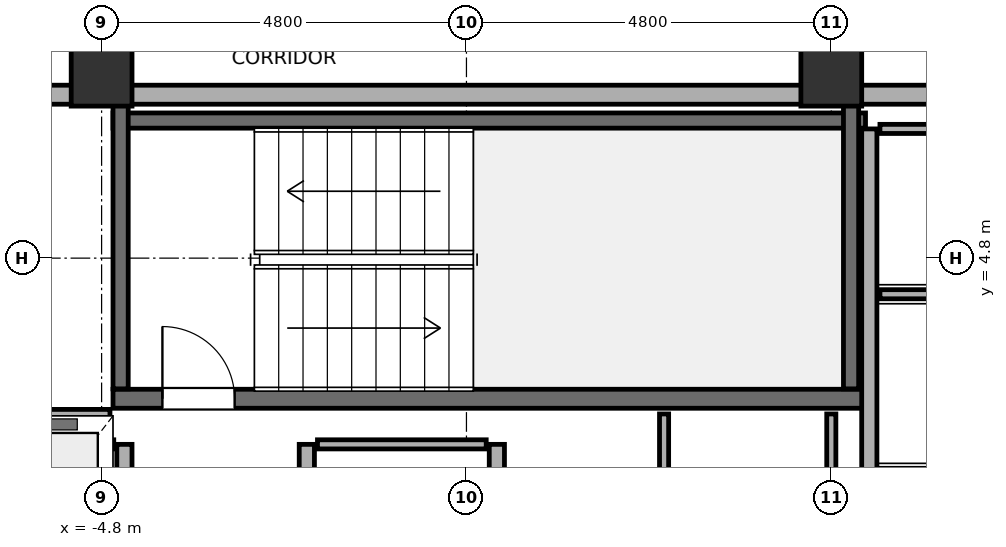
"""IFC4 building model, lengths in metres.
Left out: names, types, materials, properties, quantities, classifications, styles, units other than length and angle.
Written with IfcOpenShell. Run it as: python <this file> out.ifc"""

import sys

from ifc_helpers import new_model, si_unit, direction, frame, frame_2d, origin, origin_2d, place, context, subcontext, project, spatial, rectangle, hollow_rectangle, extrude, element, fill, save


model = new_model("IFC4")
c1 = context("Model", 3, precision=1e-05, world=origin(), true_north=direction((0.0, 1.0)))
c2 = subcontext(c1, "Body", "Model", "MODEL_VIEW")
j1 = project(units=[si_unit("LENGTHUNIT", "METRE"), si_unit("PLANEANGLEUNIT", "RADIAN")], contexts=[c1])
p1 = place(None, origin())
s1 = spatial("IfcSite", under=j1, at=p1, CompositionType="ELEMENT")
p2 = place(p1, origin())
s2 = spatial("IfcBuilding", under=s1, at=p2, CompositionType="ELEMENT")
p3 = place(p2, frame((0.0, 0.0, 30.0)))
s3 = spatial("IfcBuildingStorey", under=s2, at=p3, CompositionType="ELEMENT", Elevation=30.0)
for number, where, z_axis, x_axis in (
    (1, (-4.8, 7.2, 0.0), (0.0, 0.0, 1.0), (1.0, 0.0, 0.0)),
    (2, (4.8, 7.2, 0.0), (0.0, 0.0, 1.0), (1.0, 0.0, 0.0)),
):
    element("IfcColumn", number, at=place(p3, frame(where, z_axis=z_axis, x_axis=x_axis)), inside=s3, PredefinedType="COLUMN", context=c2, shape_type="SweptSolid", body=[
        extrude(hollow_rectangle(XDim=0.8, YDim=0.8, WallThickness=0.036, at=origin_2d()), origin(), (0.0, 0.0, 1.0), 3.7),
    ])
p4 = place(p3, frame((-14.2, 6.95, 0.0), z_axis=(0.0, 0.0, 1.0), x_axis=(1.0, 0.0, 0.0)))
e3 = element("IfcWall", 3, at=p4, inside=s3, PredefinedType="SOLIDWALL", context=c2, shape_type="SweptSolid", body=[
    extrude(rectangle(XDim=9.4, YDim=0.25, at=frame_2d((4.7, 0.0))), origin(), (0.0, 0.0, 1.0), 2.12),
])
p5 = place(p4, frame((4.9, 0.0, 0.0)))
e4 = element("IfcOpeningElement", 4, at=p5, cuts=e3, PredefinedType="OPENING", context=c2, shape_type="SweptSolid", body=[
    extrude(rectangle(XDim=1.0, YDim=2.02, at=frame_2d((0.5, 1.01))), frame((0.0, 0.14, 0.0), z_axis=(0.0, -1.0, 0.0), x_axis=(1.0, 0.0, 0.0)), (0.0, 0.0, 1.0), 0.28),
])
p6 = place(p3, frame((-4.6, 6.95, 0.0), z_axis=(0.0, 0.0, 1.0), x_axis=(1.0, 0.0, 0.0)))
e5 = element("IfcWall", 5, at=p6, inside=s3, PredefinedType="SOLIDWALL", context=c2, shape_type="SweptSolid", body=[
    extrude(rectangle(XDim=9.2, YDim=0.25, at=frame_2d((4.6, 0.0))), origin(), (0.0, 0.0, 1.0), 2.12),
])
p7 = place(p3, frame((4.8, 6.95, 0.0), z_axis=(0.0, 0.0, 1.0), x_axis=(1.0, 0.0, 0.0)))
e6 = element("IfcWall", 6, at=p7, inside=s3, PredefinedType="SOLIDWALL", context=c2, shape_type="SweptSolid", body=[
    extrude(rectangle(XDim=9.4, YDim=0.25, at=frame_2d((4.7, 0.0))), origin(), (0.0, 0.0, 1.0), 2.12),
])
p8 = place(p7, frame((3.5, 0.0, 0.0)))
e7 = element("IfcOpeningElement", 7, at=p8, cuts=e6, PredefinedType="OPENING", context=c2, shape_type="SweptSolid", body=[
    extrude(rectangle(XDim=1.2, YDim=2.02, at=frame_2d((0.6, 1.01))), frame((0.0, 0.14, 0.0), z_axis=(0.0, -1.0, 0.0), x_axis=(1.0, 0.0, 0.0)), (0.0, 0.0, 1.0), 0.28),
])
p9 = place(p3, frame((-4.65, 2.95, -0.18), z_axis=(0.0, 0.0, 1.0), x_axis=(1.0, 0.0, 0.0)))
e8 = element("IfcWall", 8, at=p9, inside=s3, PredefinedType="SOLIDWALL", context=c2, shape_type="SweptSolid", body=[
    extrude(rectangle(XDim=9.9, YDim=0.25, at=frame_2d((4.95, 0.0))), origin(), (0.0, 0.0, 1.0), 3.7),
])
p10 = place(p9, frame((0.65, 0.0, 0.18)))
e9 = element("IfcOpeningElement", 9, at=p10, cuts=e8, PredefinedType="OPENING", context=c2, shape_type="SweptSolid", body=[
    extrude(rectangle(XDim=0.95, YDim=2.15, at=frame_2d((0.475, 1.075))), frame((0.0, 0.14, 0.0), z_axis=(0.0, -1.0, 0.0), x_axis=(1.0, 0.0, 0.0)), (0.0, 0.0, 1.0), 0.28),
])
p11 = place(p3, frame((-4.65, 6.61, -0.18), z_axis=(0.0, 0.0, 1.0), x_axis=(1.0, 0.0, 0.0)))
e10 = element("IfcWall", 10, at=p11, inside=s3, PredefinedType="SOLIDWALL", context=c2, shape_type="SweptSolid", body=[
    extrude(rectangle(XDim=9.9, YDim=0.2, at=frame_2d((4.95, 0.0))), origin(), (0.0, 0.0, 1.0), 3.7),
])
for number, where, z_axis, x_axis in (
    (11, (-4.55, 3.08, -0.18), (0.0, 0.0, 1.0), (0.0, 1.0, 0.0)),
    (12, (5.06, 3.08, -0.18), (0.0, 0.0, 1.0), (0.0, 1.0, 0.0)),
):
    element("IfcWall", number, at=place(p3, frame(where, z_axis=z_axis, x_axis=x_axis)), inside=s3, PredefinedType="SOLIDWALL", context=c2, shape_type="SweptSolid", body=[
        extrude(rectangle(XDim=3.74, YDim=0.2, at=frame_2d((1.87, 0.0))), origin(), (0.0, 0.0, 1.0), 3.7),
    ])
p12 = place(p3, frame((-4.5, -6.5, 0.0), z_axis=(0.0, 0.0, 1.0), x_axis=(0.0, 1.0, 0.0)))
e13 = element("IfcWall", 13, at=p12, inside=s3, PredefinedType="SOLIDWALL", context=c2, shape_type="SweptSolid", body=[
    extrude(rectangle(XDim=8.85, YDim=0.2, at=frame_2d((4.425, 0.0))), origin(), (0.0, 0.0, 1.0), 3.52),
])
p13 = place(p12, frame((0.5, 0.0, 0.0)))
e14 = element("IfcOpeningElement", 14, at=p13, cuts=e13, PredefinedType="OPENING", context=c2, shape_type="SweptSolid", body=[
    extrude(rectangle(XDim=1.1, YDim=2.2, at=frame_2d((0.55, 1.1))), frame((0.0, 0.115, 0.0), z_axis=(0.0, -1.0, 0.0), x_axis=(1.0, 0.0, 0.0)), (0.0, 0.0, 1.0), 0.23),
])
p14 = place(p12, frame((2.75, 0.0, 0.0)))
e15 = element("IfcOpeningElement", 15, at=p14, cuts=e13, PredefinedType="OPENING", context=c2, shape_type="SweptSolid", body=[
    extrude(rectangle(XDim=1.1, YDim=2.2, at=frame_2d((0.55, 1.1))), frame((0.0, 0.115, 0.0), z_axis=(0.0, -1.0, 0.0), x_axis=(1.0, 0.0, 0.0)), (0.0, 0.0, 1.0), 0.23),
])
p15 = place(p12, frame((5.0, 0.0, 0.0)))
e16 = element("IfcOpeningElement", 16, at=p15, cuts=e13, PredefinedType="OPENING", context=c2, shape_type="SweptSolid", body=[
    extrude(rectangle(XDim=1.1, YDim=2.2, at=frame_2d((0.55, 1.1))), frame((0.0, 0.115, 0.0), z_axis=(0.0, -1.0, 0.0), x_axis=(1.0, 0.0, 0.0)), (0.0, 0.0, 1.0), 0.23),
])
p16 = place(p12, frame((7.25, 0.0, 0.0)))
e17 = element("IfcOpeningElement", 17, at=p16, cuts=e13, PredefinedType="OPENING", context=c2, shape_type="SweptSolid", body=[
    extrude(rectangle(XDim=1.1, YDim=2.2, at=frame_2d((0.55, 1.1))), frame((0.0, 0.115, 0.0), z_axis=(0.0, -1.0, 0.0), x_axis=(1.0, 0.0, 0.0)), (0.0, 0.0, 1.0), 0.23),
])
p17 = place(p3, frame((-6.86, 2.35, 0.0), z_axis=(0.0, 0.0, 1.0), x_axis=(1.0, 0.0, 0.0)))
e18 = element("IfcWall", 18, at=p17, inside=s3, PredefinedType="PARTITIONING", context=c2, shape_type="SweptSolid", body=[
    extrude(rectangle(XDim=2.22, YDim=0.12, at=frame_2d((1.11, 0.0))), origin(), (0.0, 0.0, 1.0), 3.52),
])
for number, where, z_axis, x_axis in (
    (19, (-2.1, -6.5, 0.0), (0.0, 0.0, 1.0), (0.0, 1.0, 0.0)),
    (20, (0.4, -6.5, 0.0), (0.0, 0.0, 1.0), (0.0, 1.0, 0.0)),
):
    element("IfcWall", number, at=place(p3, frame(where, z_axis=z_axis, x_axis=x_axis)), inside=s3, PredefinedType="SOLIDWALL", context=c2, shape_type="SweptSolid", body=[
        extrude(rectangle(XDim=8.85, YDim=0.2, at=frame_2d((4.425, 0.0))), origin(), (0.0, 0.0, 1.0), 3.52),
    ])
p18 = place(p3, frame((-1.96, 2.35, 0.0), z_axis=(0.0, 0.0, 1.0), x_axis=(1.0, 0.0, 0.0)))
e21 = element("IfcWall", 21, at=p18, inside=s3, PredefinedType="PARTITIONING", context=c2, shape_type="SweptSolid", body=[
    extrude(rectangle(XDim=2.22, YDim=0.12, at=frame_2d((1.11, 0.0))), origin(), (0.0, 0.0, 1.0), 3.52),
])
p19 = place(p3, frame((5.3, -0.3, 0.0), z_axis=(0.0, 0.0, 1.0), x_axis=(0.0, 1.0, 0.0)))
e22 = element("IfcWall", 22, at=p19, inside=s3, PredefinedType="SOLIDWALL", context=c2, shape_type="SweptSolid", body=[
    extrude(rectangle(XDim=6.8, YDim=0.2, at=frame_2d((3.4, 0.0))), origin(), (0.0, 0.0, 1.0), 3.52),
])
for number, where, z_axis, x_axis in (
    (23, (5.44, 4.325, 0.0), (0.0, 0.0, 1.0), (1.0, 0.0, 0.0)),
    (24, (5.44, 6.5, 0.0), (0.0, 0.0, 1.0), (1.0, 0.0, 0.0)),
):
    element("IfcWall", number, at=place(p3, frame(where, z_axis=z_axis, x_axis=x_axis)), inside=s3, PredefinedType="PARTITIONING", context=c2, shape_type="SweptSolid", body=[
        extrude(rectangle(XDim=2.12, YDim=0.12, at=frame_2d((1.06, 0.0))), origin(), (0.0, 0.0, 1.0), 3.52),
    ])
p20 = place(p3, frame((-7.0, 2.75, 0.0), z_axis=(0.0, 0.0, 1.0), x_axis=(1.0, 0.0, 0.0)))
e25 = element("IfcWall", 25, at=p20, inside=s3, PredefinedType="PARTITIONING", context=c2, shape_type="SweptSolid", body=[
    extrude(rectangle(XDim=2.31, YDim=0.12, at=frame_2d((1.155, 0.0))), origin(), (0.0, 0.0, 1.0), 3.52),
])
p21 = place(p3, frame((2.6, -6.415, 0.0), z_axis=(0.0, 0.0, 1.0), x_axis=(0.0, 1.0, 0.0)))
e26 = element("IfcWall", 26, at=p21, inside=s3, PredefinedType="PARTITIONING", context=c2, shape_type="SweptSolid", body=[
    extrude(rectangle(XDim=9.165, YDim=0.12, at=frame_2d((4.583, 0.0))), origin(), (0.0, 0.0, 1.0), 3.52),
])
p22 = place(p21, frame((1.465, 0.0, 0.0)))
e27 = element("IfcOpeningElement", 27, at=p22, cuts=e26, PredefinedType="OPENING", context=c2, shape_type="SweptSolid", body=[
    extrude(rectangle(XDim=0.9, YDim=2.1, at=frame_2d((0.45, 1.05))), frame((0.0, 0.075, 0.0), z_axis=(0.0, -1.0, 0.0), x_axis=(1.0, 0.0, 0.0)), (0.0, 0.0, 1.0), 0.15),
])
p23 = place(p21, frame((6.465, 0.0, 0.0)))
e28 = element("IfcOpeningElement", 28, at=p23, cuts=e26, PredefinedType="OPENING", context=c2, shape_type="SweptSolid", body=[
    extrude(rectangle(XDim=0.9, YDim=2.1, at=frame_2d((0.45, 1.05))), frame((0.0, 0.075, 0.0), z_axis=(0.0, -1.0, 0.0), x_axis=(1.0, 0.0, 0.0)), (0.0, 0.0, 1.0), 0.15),
])
p24 = place(p3, frame((4.8, -6.415, 0.0), z_axis=(0.0, 0.0, 1.0), x_axis=(0.0, 1.0, 0.0)))
e29 = element("IfcWall", 29, at=p24, inside=s3, PredefinedType="PARTITIONING", context=c2, shape_type="SweptSolid", body=[
    extrude(rectangle(XDim=9.165, YDim=0.12, at=frame_2d((4.583, 0.0))), origin(), (0.0, 0.0, 1.0), 3.52),
])
p25 = place(p10, origin())
e30 = element("IfcDoor", 30, at=p25, inside=s3, OperationType="SINGLE_SWING_LEFT", PredefinedType="DOOR", context=c2, shape_type="SweptSolid", body=[
    extrude(rectangle(XDim=0.95, YDim=2.15, at=frame_2d((0.475, 1.075))), frame((0.0, 0.025, 0.0), z_axis=(0.0, -1.0, 0.0), x_axis=(1.0, 0.0, 0.0)), (0.0, 0.0, 1.0), 0.05),
])
fill(e9, e30)
save(model, sys.argv[1])
